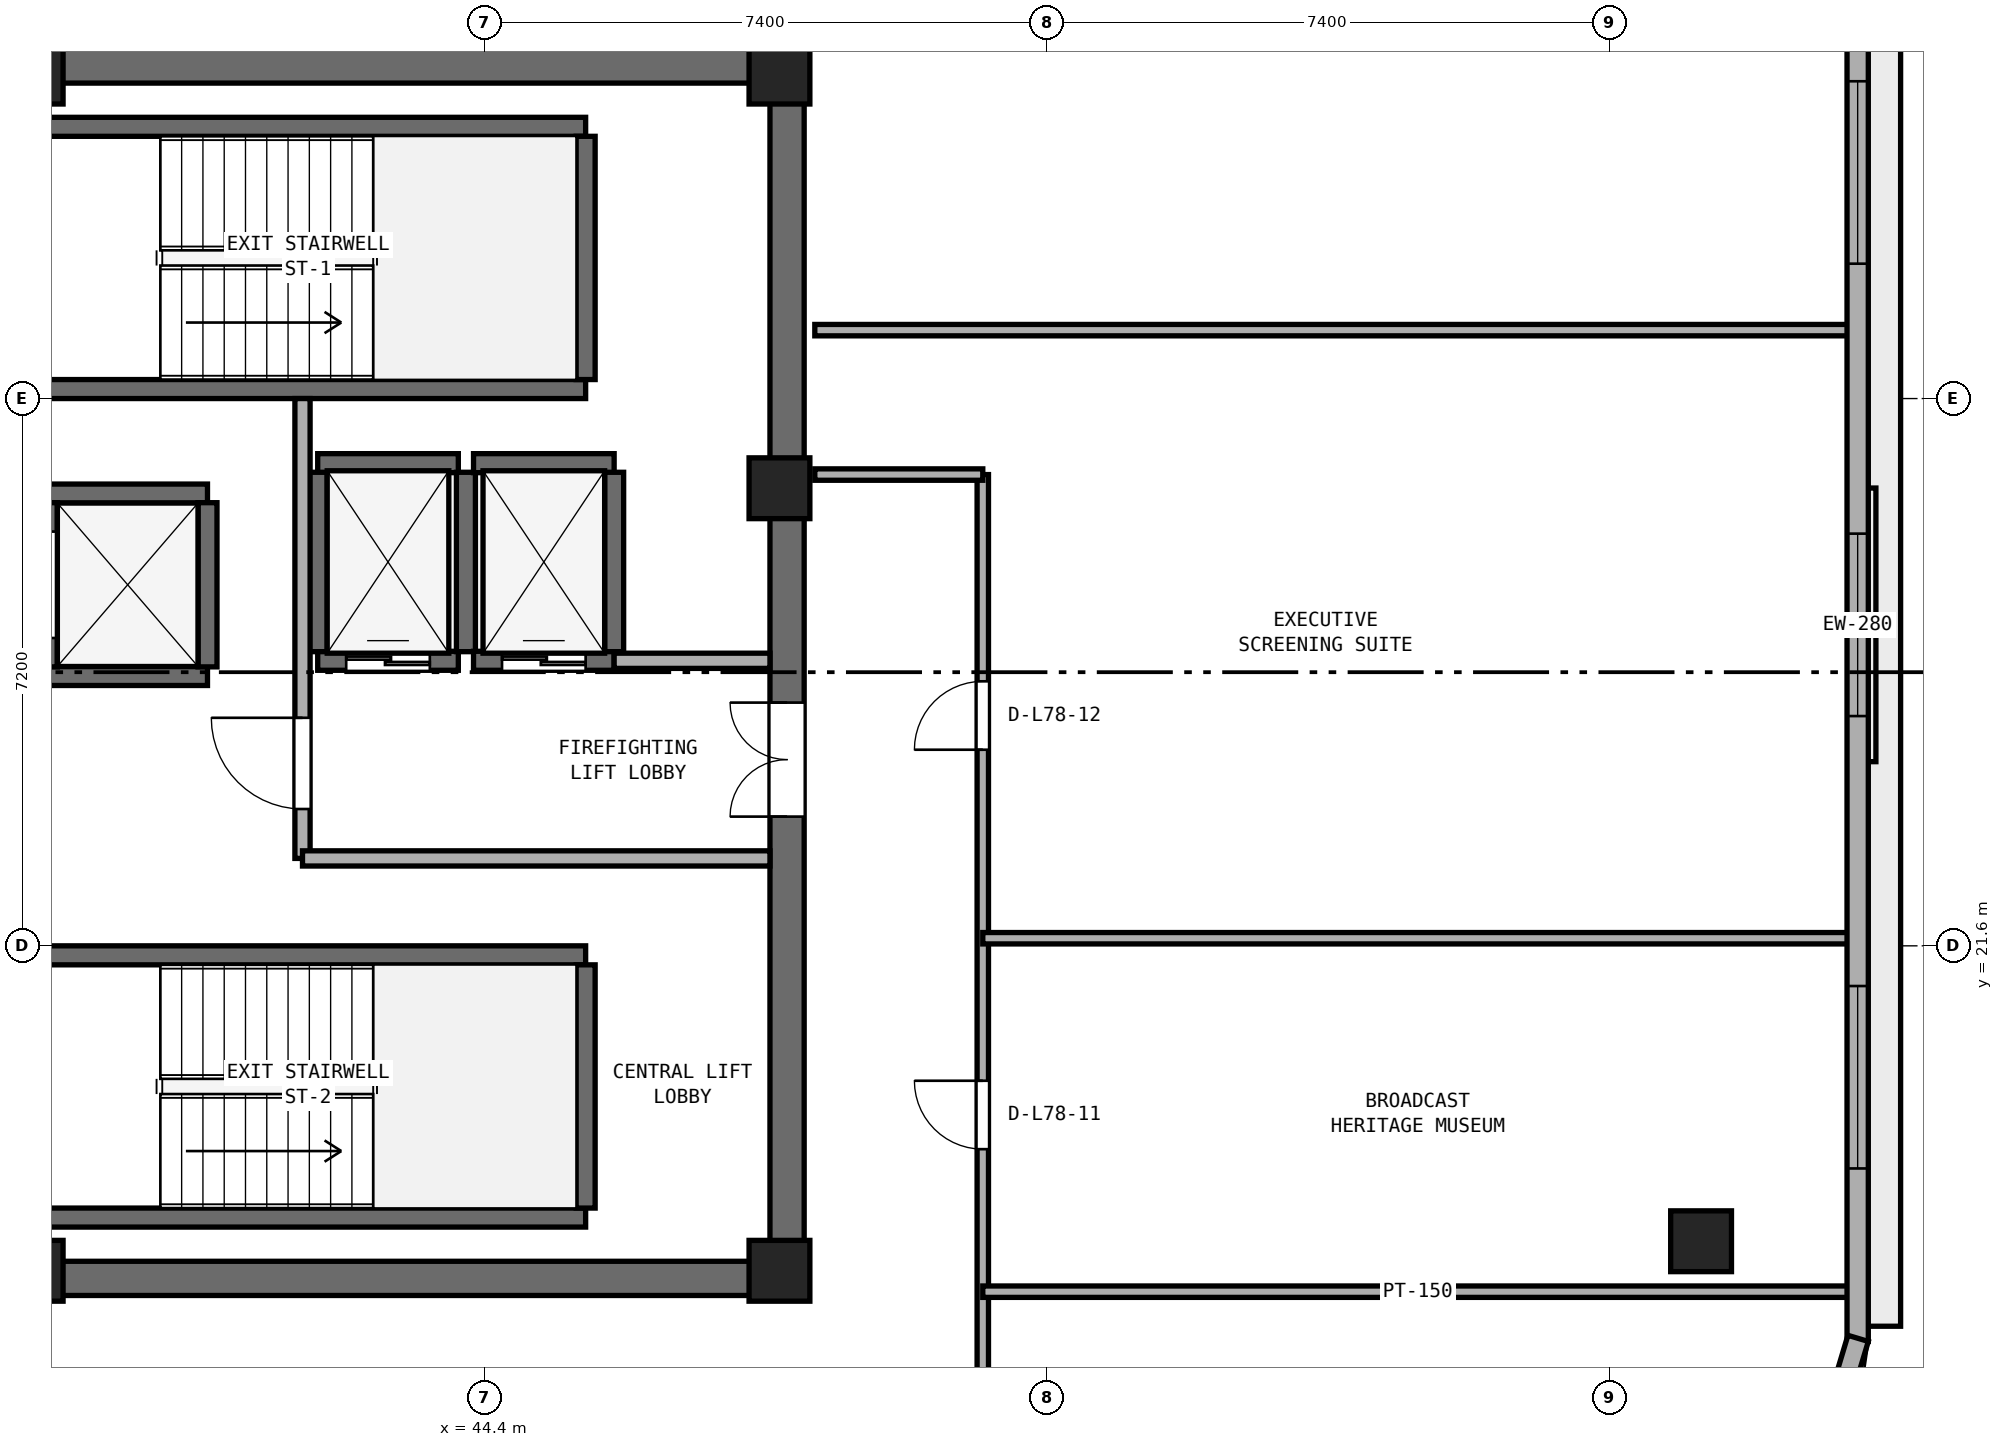
"""IFC4 building model, lengths in metres.
Left out: names, types, materials, properties, quantities, classifications, styles, units other than length and angle.
Written with IfcOpenShell. Run it as: python <this file> out.ifc"""

import sys

from ifc_helpers import new_model, si_unit, direction, frame, frame_2d, origin, origin_2d, place, context, subcontext, project, spatial, rectangle, extrude, element, fill, save


model = new_model("IFC4")
c1 = context("Model", 3, precision=1e-05, world=origin(), true_north=direction((0.0, 1.0)))
c2 = subcontext(c1, "Body", "Model", "MODEL_VIEW")
j1 = project(units=[si_unit("LENGTHUNIT", "METRE"), si_unit("PLANEANGLEUNIT", "RADIAN")], contexts=[c1])
p1 = place(None, origin())
s1 = spatial("IfcSite", under=j1, at=p1, CompositionType="ELEMENT")
p2 = place(p1, origin())
s2 = spatial("IfcBuilding", under=s1, at=p2, CompositionType="ELEMENT")
p3 = place(p2, frame((0.0, 0.0, 304.8)))
s3 = spatial("IfcBuildingStorey", under=s2, at=p3, CompositionType="ELEMENT", Elevation=304.8)
for number, where, z_axis, x_axis in (
    (1, (25.4, 17.225, 0.0), (0.0, 0.0, 1.0), (1.0, 0.0, 0.0)),
    (2, (25.4, 33.175, 0.0), (0.0, 0.0, 1.0), (1.0, 0.0, 0.0)),
):
    element("IfcWall", number, at=place(p3, frame(where, z_axis=z_axis, x_axis=x_axis)), inside=s3, PredefinedType="SHEAR", context=c2, shape_type="SweptSolid", body=[
        extrude(rectangle(XDim=23.2, YDim=0.45, at=frame_2d((11.6, 0.0))), origin(), (0.0, 0.0, 1.0), 3.4),
    ])
p4 = place(p3, frame((48.375, 17.45, 0.0), z_axis=(0.0, 0.0, 1.0), x_axis=(0.0, 1.0, 0.0)))
e3 = element("IfcWall", 3, at=p4, inside=s3, PredefinedType="SHEAR", context=c2, shape_type="SweptSolid", body=[
    extrude(rectangle(XDim=15.5, YDim=0.45, at=frame_2d((7.75, 0.0))), origin(), (0.0, 0.0, 1.0), 3.4),
])
p5 = place(p4, frame((5.85, 0.0, 0.0)))
e4 = element("IfcOpeningElement", 4, at=p5, cuts=e3, PredefinedType="OPENING", context=c2, shape_type="SweptSolid", body=[
    extrude(rectangle(XDim=1.5, YDim=2.15, at=frame_2d((0.75, 1.075))), frame((0.0, 0.235, 0.0), z_axis=(0.0, -1.0, 0.0), x_axis=(1.0, 0.0, 0.0)), (0.0, 0.0, 1.0), 0.47),
])
for number, where, z_axis, x_axis in (
    (5, (38.45, 17.325, 0.0), (0.0, 0.0, 1.0), (1.0, 0.0, 0.0)),
    (6, (48.275, 17.325, 0.0), (0.0, 0.0, 1.0), (1.0, 0.0, 0.0)),
    (7, (48.275, 27.62, 0.0), (0.0, 0.0, 1.0), (1.0, 0.0, 0.0)),
    (8, (48.275, 33.075, 0.0), (0.0, 0.0, 1.0), (1.0, 0.0, 0.0)),
    (9, (38.45, 33.075, 0.0), (0.0, 0.0, 1.0), (1.0, 0.0, 0.0)),
):
    element("IfcColumn", number, at=place(p3, frame(where, z_axis=z_axis, x_axis=x_axis)), inside=s3, PredefinedType="PILASTER", context=c2, shape_type="SweptSolid", body=[
        extrude(rectangle(XDim=0.8, YDim=0.8, at=origin_2d()), origin(), (0.0, 0.0, 1.0), 3.8),
    ])
p6 = place(p3, frame((60.4, 17.714, 0.0), z_axis=(0.0, 0.0, 1.0), x_axis=(1.0, 0.0, 0.0)))
e10 = element("IfcColumn", 10, at=p6, inside=s3, PredefinedType="COLUMN", context=c2, shape_type="SweptSolid", body=[
    extrude(rectangle(XDim=0.8, YDim=0.8, at=origin_2d()), origin(), (0.0, 0.0, 1.0), 3.8),
])
for number, where, z_axis, x_axis in (
    (11, (38.425, 28.925, 0.0), (0.0, 0.0, 1.0), (1.0, 0.0, 0.0)),
    (12, (38.425, 32.375, 0.0), (0.0, 0.0, 1.0), (1.0, 0.0, 0.0)),
):
    element("IfcWall", number, at=place(p3, frame(where, z_axis=z_axis, x_axis=x_axis)), inside=s3, PredefinedType="SHEAR", context=c2, shape_type="SweptSolid", body=[
        extrude(rectangle(XDim=7.3, YDim=0.25, at=frame_2d((3.65, 0.0))), origin(), (0.0, 0.0, 1.0), 3.4),
    ])
p7 = place(p3, frame((45.725, 29.05, 0.0), z_axis=(0.0, 0.0, 1.0), x_axis=(0.0, 1.0, 0.0)))
e13 = element("IfcWall", 13, at=p7, inside=s3, PredefinedType="SHEAR", context=c2, shape_type="SweptSolid", body=[
    extrude(rectangle(XDim=3.2, YDim=0.25, at=frame_2d((1.6, 0.0))), origin(), (0.0, 0.0, 1.0), 3.4),
])
for number, where, z_axis, x_axis in (
    (14, (38.425, 18.025, 0.0), (0.0, 0.0, 1.0), (1.0, 0.0, 0.0)),
    (15, (38.425, 21.475, 0.0), (0.0, 0.0, 1.0), (1.0, 0.0, 0.0)),
):
    element("IfcWall", number, at=place(p3, frame(where, z_axis=z_axis, x_axis=x_axis)), inside=s3, PredefinedType="SHEAR", context=c2, shape_type="SweptSolid", body=[
        extrude(rectangle(XDim=7.3, YDim=0.25, at=frame_2d((3.65, 0.0))), origin(), (0.0, 0.0, 1.0), 3.4),
    ])
p8 = place(p3, frame((45.725, 18.15, 0.0), z_axis=(0.0, 0.0, 1.0), x_axis=(0.0, 1.0, 0.0)))
e16 = element("IfcWall", 16, at=p8, inside=s3, PredefinedType="SHEAR", context=c2, shape_type="SweptSolid", body=[
    extrude(rectangle(XDim=3.2, YDim=0.25, at=frame_2d((1.6, 0.0))), origin(), (0.0, 0.0, 1.0), 3.4),
])
p9 = place(p3, frame((42.2, 25.35, 0.0), z_axis=(0.0, 0.0, 1.0), x_axis=(1.0, 0.0, 0.0)))
e17 = element("IfcWall", 17, at=p9, inside=s3, PredefinedType="SHEAR", context=c2, shape_type="SweptSolid", body=[
    extrude(rectangle(XDim=1.85, YDim=0.25, at=frame_2d((0.925, 0.0))), origin(), (0.0, 0.0, 1.0), 3.4),
])
p10 = place(p9, frame((0.375, 0.0, 0.0)))
e18 = element("IfcOpeningElement", 18, at=p10, cuts=e17, PredefinedType="OPENING", context=c2, shape_type="SweptSolid", body=[
    extrude(rectangle(XDim=1.1, YDim=2.15, at=frame_2d((0.55, 1.075))), frame((0.0, 0.135, 0.0), z_axis=(0.0, -1.0, 0.0), x_axis=(1.0, 0.0, 0.0)), (0.0, 0.0, 1.0), 0.27),
])
p11 = place(p3, frame((42.2, 27.95, 0.0), z_axis=(0.0, 0.0, 1.0), x_axis=(1.0, 0.0, 0.0)))
e19 = element("IfcWall", 19, at=p11, inside=s3, PredefinedType="SHEAR", context=c2, shape_type="SweptSolid", body=[
    extrude(rectangle(XDim=1.85, YDim=0.25, at=frame_2d((0.925, 0.0))), origin(), (0.0, 0.0, 1.0), 3.4),
])
for number, where, z_axis, x_axis in (
    (20, (42.2, 25.47, 0.0), (0.0, 0.0, 1.0), (0.0, 1.0, 0.0)),
    (21, (44.15, 25.47, 0.0), (0.0, 0.0, 1.0), (0.0, 1.0, 0.0)),
):
    element("IfcWall", number, at=place(p3, frame(where, z_axis=z_axis, x_axis=x_axis)), inside=s3, PredefinedType="SHEAR", context=c2, shape_type="SweptSolid", body=[
        extrude(rectangle(XDim=2.36, YDim=0.25, at=frame_2d((1.18, 0.0))), origin(), (0.0, 0.0, 1.0), 3.4),
    ])
p12 = place(p3, frame((44.25, 25.35, 0.0), z_axis=(0.0, 0.0, 1.0), x_axis=(1.0, 0.0, 0.0)))
e22 = element("IfcWall", 22, at=p12, inside=s3, PredefinedType="SHEAR", context=c2, shape_type="SweptSolid", body=[
    extrude(rectangle(XDim=1.85, YDim=0.25, at=frame_2d((0.925, 0.0))), origin(), (0.0, 0.0, 1.0), 3.4),
])
p13 = place(p12, frame((0.375, 0.0, 0.0)))
e23 = element("IfcOpeningElement", 23, at=p13, cuts=e22, PredefinedType="OPENING", context=c2, shape_type="SweptSolid", body=[
    extrude(rectangle(XDim=1.1, YDim=2.15, at=frame_2d((0.55, 1.075))), frame((0.0, 0.135, 0.0), z_axis=(0.0, -1.0, 0.0), x_axis=(1.0, 0.0, 0.0)), (0.0, 0.0, 1.0), 0.27),
])
p14 = place(p3, frame((44.25, 27.95, 0.0), z_axis=(0.0, 0.0, 1.0), x_axis=(1.0, 0.0, 0.0)))
e24 = element("IfcWall", 24, at=p14, inside=s3, PredefinedType="SHEAR", context=c2, shape_type="SweptSolid", body=[
    extrude(rectangle(XDim=1.85, YDim=0.25, at=frame_2d((0.925, 0.0))), origin(), (0.0, 0.0, 1.0), 3.4),
])
p15 = place(p3, frame((46.1, 25.47, 0.0), z_axis=(0.0, 0.0, 1.0), x_axis=(0.0, 1.0, 0.0)))
e25 = element("IfcWall", 25, at=p15, inside=s3, PredefinedType="SHEAR", context=c2, shape_type="SweptSolid", body=[
    extrude(rectangle(XDim=2.36, YDim=0.25, at=frame_2d((1.18, 0.0))), origin(), (0.0, 0.0, 1.0), 3.4),
])
for number, where, z_axis, x_axis in (
    (26, (38.65, 25.15, 0.0), (0.0, 0.0, 1.0), (1.0, 0.0, 0.0)),
    (27, (38.65, 27.55, 0.0), (0.0, 0.0, 1.0), (1.0, 0.0, 0.0)),
):
    element("IfcWall", number, at=place(p3, frame(where, z_axis=z_axis, x_axis=x_axis)), inside=s3, PredefinedType="SHEAR", context=c2, shape_type="SweptSolid", body=[
        extrude(rectangle(XDim=2.1, YDim=0.25, at=frame_2d((1.05, 0.0))), origin(), (0.0, 0.0, 1.0), 3.4),
    ])
p16 = place(p3, frame((38.65, 25.27, 0.0), z_axis=(0.0, 0.0, 1.0), x_axis=(0.0, 1.0, 0.0)))
e28 = element("IfcWall", 28, at=p16, inside=s3, PredefinedType="SHEAR", context=c2, shape_type="SweptSolid", body=[
    extrude(rectangle(XDim=2.16, YDim=0.25, at=frame_2d((1.08, 0.0))), origin(), (0.0, 0.0, 1.0), 3.4),
])
p17 = place(p16, frame((0.38, 0.0, 0.0)))
e29 = element("IfcOpeningElement", 29, at=p17, cuts=e28, PredefinedType="OPENING", context=c2, shape_type="SweptSolid", body=[
    extrude(rectangle(XDim=1.4, YDim=2.2, at=frame_2d((0.7, 1.1))), frame((0.0, 0.135, 0.0), z_axis=(0.0, -1.0, 0.0), x_axis=(1.0, 0.0, 0.0)), (0.0, 0.0, 1.0), 0.27),
])
p18 = place(p3, frame((40.75, 25.27, 0.0), z_axis=(0.0, 0.0, 1.0), x_axis=(0.0, 1.0, 0.0)))
e30 = element("IfcWall", 30, at=p18, inside=s3, PredefinedType="SHEAR", context=c2, shape_type="SweptSolid", body=[
    extrude(rectangle(XDim=2.16, YDim=0.25, at=frame_2d((1.08, 0.0))), origin(), (0.0, 0.0, 1.0), 3.4),
])
p19 = place(p3, frame((42.0, 22.75, 0.0), z_axis=(0.0, 0.0, 1.0), x_axis=(0.0, 1.0, 0.0)))
e31 = element("IfcWall", 31, at=p19, inside=s3, PredefinedType="SOLIDWALL", context=c2, shape_type="SweptSolid", body=[
    extrude(rectangle(XDim=6.05, YDim=0.2, at=frame_2d((3.025, 0.0))), origin(), (0.0, 0.0, 1.0), 3.4),
])
p20 = place(p19, frame((0.65, 0.0, 0.0)))
e32 = element("IfcOpeningElement", 32, at=p20, cuts=e31, PredefinedType="OPENING", context=c2, shape_type="SweptSolid", body=[
    extrude(rectangle(XDim=1.2, YDim=2.15, at=frame_2d((0.6, 1.075))), frame((0.0, 0.11, 0.0), z_axis=(0.0, -1.0, 0.0), x_axis=(1.0, 0.0, 0.0)), (0.0, 0.0, 1.0), 0.22),
])
p21 = place(p3, frame((42.0, 22.75, 0.0), z_axis=(0.0, 0.0, 1.0), x_axis=(1.0, 0.0, 0.0)))
e33 = element("IfcWall", 33, at=p21, inside=s3, PredefinedType="SOLIDWALL", context=c2, shape_type="SweptSolid", body=[
    extrude(rectangle(XDim=6.15, YDim=0.2, at=frame_2d((3.075, 0.0))), origin(), (0.0, 0.0, 1.0), 3.4),
])
p22 = place(p3, frame((46.1, 25.35, 0.0), z_axis=(0.0, 0.0, 1.0), x_axis=(1.0, 0.0, 0.0)))
e34 = element("IfcWall", 34, at=p22, inside=s3, PredefinedType="SOLIDWALL", context=c2, shape_type="SweptSolid", body=[
    extrude(rectangle(XDim=2.05, YDim=0.2, at=frame_2d((1.025, 0.0))), origin(), (0.0, 0.0, 1.0), 3.4),
])
p23 = place(p3, frame((50.95, 14.65, 0.0), z_axis=(0.0, 0.0, 1.0), x_axis=(0.0, 1.0, 0.0)))
e35 = element("IfcWall", 35, at=p23, inside=s3, PredefinedType="PARTITIONING", context=c2, shape_type="SweptSolid", body=[
    extrude(rectangle(XDim=13.15, YDim=0.15, at=frame_2d((6.575, 0.0))), origin(), (0.0, 0.0, 1.0), 3.4),
])
p24 = place(p23, frame((4.275, 0.0, 0.0)))
e36 = element("IfcOpeningElement", 36, at=p24, cuts=e35, PredefinedType="OPENING", context=c2, shape_type="SweptSolid", body=[
    extrude(rectangle(XDim=0.9, YDim=2.1, at=frame_2d((0.45, 1.05))), frame((0.0, 0.085, 0.0), z_axis=(0.0, -1.0, 0.0), x_axis=(1.0, 0.0, 0.0)), (0.0, 0.0, 1.0), 0.17),
])
p25 = place(p23, frame((9.53, 0.0, 0.0)))
e37 = element("IfcOpeningElement", 37, at=p25, cuts=e35, PredefinedType="OPENING", context=c2, shape_type="SweptSolid", body=[
    extrude(rectangle(XDim=0.9, YDim=2.1, at=frame_2d((0.45, 1.05))), frame((0.0, 0.085, 0.0), z_axis=(0.0, -1.0, 0.0), x_axis=(1.0, 0.0, 0.0)), (0.0, 0.0, 1.0), 0.17),
])
for number, where, z_axis, x_axis in (
    (38, (50.95, 17.05, 0.0), (0.0, 0.0, 1.0), (1.0, 0.0, 0.0)),
    (39, (50.95, 21.7, 0.0), (0.0, 0.0, 1.0), (1.0, 0.0, 0.0)),
):
    element("IfcWall", number, at=place(p3, frame(where, z_axis=z_axis, x_axis=x_axis)), inside=s3, PredefinedType="PARTITIONING", context=c2, shape_type="SweptSolid", body=[
        extrude(rectangle(XDim=11.445, YDim=0.15, at=frame_2d((5.723, 0.0))), origin(), (0.0, 0.0, 1.0), 3.4),
    ])
p26 = place(p3, frame((48.74, 27.8, 0.0), z_axis=(0.0, 0.0, 1.0), x_axis=(1.0, 0.0, 0.0)))
e40 = element("IfcWall", 40, at=p26, inside=s3, PredefinedType="PARTITIONING", context=c2, shape_type="SweptSolid", body=[
    extrude(rectangle(XDim=2.21, YDim=0.15, at=frame_2d((1.105, 0.0))), origin(), (0.0, 0.0, 1.0), 3.4),
])
p27 = place(p3, frame((48.74, 29.7, 0.0), z_axis=(0.0, 0.0, 1.0), x_axis=(1.0, 0.0, 0.0)))
e41 = element("IfcWall", 41, at=p27, inside=s3, PredefinedType="PARTITIONING", context=c2, shape_type="SweptSolid", body=[
    extrude(rectangle(XDim=13.655, YDim=0.15, at=frame_2d((6.828, 0.0))), origin(), (0.0, 0.0, 1.0), 3.4),
])
p28 = place(p3, frame((62.46, 16.396, 0.0), z_axis=(0.0, 0.0, 1.0), x_axis=(0.0, 1.0, 0.0)))
e42 = element("IfcWall", 42, at=p28, inside=s3, PredefinedType="STANDARD", context=c2, shape_type="SweptSolid", body=[
    extrude(rectangle(XDim=18.854, YDim=0.28, at=frame_2d((9.427, 0.0))), origin(), (0.0, 0.0, 1.0), 3.4),
])
p29 = place(p28, frame((2.276, 0.0, 0.9)))
e43 = element("IfcOpeningElement", 43, at=p29, cuts=e42, PredefinedType="OPENING", context=c2, shape_type="SweptSolid", body=[
    extrude(rectangle(XDim=2.4, YDim=1.75, at=frame_2d((1.2, 0.875))), frame((0.0, 0.15, 0.0), z_axis=(0.0, -1.0, 0.0), x_axis=(1.0, 0.0, 0.0)), (0.0, 0.0, 1.0), 0.3),
])
p30 = place(p28, frame((8.227, 0.0, 0.9)))
e44 = element("IfcOpeningElement", 44, at=p30, cuts=e42, PredefinedType="OPENING", context=c2, shape_type="SweptSolid", body=[
    extrude(rectangle(XDim=2.4, YDim=1.75, at=frame_2d((1.2, 0.875))), frame((0.0, 0.15, 0.0), z_axis=(0.0, -1.0, 0.0), x_axis=(1.0, 0.0, 0.0)), (0.0, 0.0, 1.0), 0.3),
])
p31 = place(p28, frame((14.179, 0.0, 0.9)))
e45 = element("IfcOpeningElement", 45, at=p31, cuts=e42, PredefinedType="OPENING", context=c2, shape_type="SweptSolid", body=[
    extrude(rectangle(XDim=2.4, YDim=1.75, at=frame_2d((1.2, 0.875))), frame((0.0, 0.15, 0.0), z_axis=(0.0, -1.0, 0.0), x_axis=(1.0, 0.0, 0.0)), (0.0, 0.0, 1.0), 0.3),
])
p32 = place(p3, frame((61.839, 14.344, 0.0), z_axis=(0.0, 0.0, 1.0), x_axis=(0.287235049694, 0.957860128739, 0.0)))
e46 = element("IfcWall", 46, at=p32, inside=s3, PredefinedType="STANDARD", context=c2, shape_type="SweptSolid", body=[
    extrude(rectangle(XDim=2.184, YDim=0.28, at=frame_2d((1.092, 0.0))), origin(), (0.0, 0.0, 1.0), 3.4),
])
p33 = place(p10, origin())
e47 = element("IfcDoor", 47, at=p33, inside=s3, OperationType="DOUBLE_DOOR_SLIDING", PredefinedType="DOOR", context=c2, shape_type="SweptSolid", body=[
    extrude(rectangle(XDim=1.1, YDim=2.15, at=frame_2d((0.55, 1.075))), frame((0.0, 0.025, 0.0), z_axis=(0.0, -1.0, 0.0), x_axis=(1.0, 0.0, 0.0)), (0.0, 0.0, 1.0), 0.05),
])
fill(e18, e47)
p34 = place(p13, origin())
e48 = element("IfcDoor", 48, at=p34, inside=s3, OperationType="DOUBLE_DOOR_SLIDING", PredefinedType="DOOR", context=c2, shape_type="SweptSolid", body=[
    extrude(rectangle(XDim=1.1, YDim=2.15, at=frame_2d((0.55, 1.075))), frame((0.0, 0.025, 0.0), z_axis=(0.0, -1.0, 0.0), x_axis=(1.0, 0.0, 0.0)), (0.0, 0.0, 1.0), 0.05),
])
fill(e23, e48)
p35 = place(p20, origin())
e49 = element("IfcDoor", 49, at=p35, inside=s3, OperationType="SINGLE_SWING_RIGHT", PredefinedType="DOOR", context=c2, shape_type="SweptSolid", body=[
    extrude(rectangle(XDim=1.2, YDim=2.15, at=frame_2d((0.6, 1.075))), frame((0.0, 0.025, 0.0), z_axis=(0.0, -1.0, 0.0), x_axis=(1.0, 0.0, 0.0)), (0.0, 0.0, 1.0), 0.05),
])
fill(e32, e49)
p36 = place(p5, origin())
e50 = element("IfcDoor", 50, at=p36, inside=s3, OperationType="DOUBLE_DOOR_SINGLE_SWING", PredefinedType="DOOR", context=c2, shape_type="SweptSolid", body=[
    extrude(rectangle(XDim=1.5, YDim=2.15, at=frame_2d((0.75, 1.075))), frame((0.0, 0.025, 0.0), z_axis=(0.0, -1.0, 0.0), x_axis=(1.0, 0.0, 0.0)), (0.0, 0.0, 1.0), 0.05),
])
fill(e4, e50)
p37 = place(p24, origin())
e51 = element("IfcDoor", 51, at=p37, inside=s3, OperationType="SINGLE_SWING_RIGHT", PredefinedType="DOOR", context=c2, shape_type="SweptSolid", body=[
    extrude(rectangle(XDim=0.9, YDim=2.1, at=frame_2d((0.45, 1.05))), frame((0.0, 0.025, 0.0), z_axis=(0.0, -1.0, 0.0), x_axis=(1.0, 0.0, 0.0)), (0.0, 0.0, 1.0), 0.05),
])
fill(e36, e51)
p38 = place(p25, origin())
e52 = element("IfcDoor", 52, at=p38, inside=s3, OperationType="SINGLE_SWING_LEFT", PredefinedType="DOOR", context=c2, shape_type="SweptSolid", body=[
    extrude(rectangle(XDim=0.9, YDim=2.1, at=frame_2d((0.45, 1.05))), frame((0.0, 0.025, 0.0), z_axis=(0.0, -1.0, 0.0), x_axis=(1.0, 0.0, 0.0)), (0.0, 0.0, 1.0), 0.05),
])
fill(e37, e52)
p39 = place(p29, origin())
e53 = element("IfcWindow", 53, at=p39, inside=s3, PartitioningType="SINGLE_PANEL", PredefinedType="WINDOW", context=c2, shape_type="SweptSolid", body=[
    extrude(rectangle(XDim=2.4, YDim=1.75, at=frame_2d((1.2, 0.875))), frame((0.0, 0.03, 0.0), z_axis=(0.0, -1.0, 0.0), x_axis=(1.0, 0.0, 0.0)), (0.0, 0.0, 1.0), 0.06),
])
fill(e43, e53)
p40 = place(p30, origin())
e54 = element("IfcWindow", 54, at=p40, inside=s3, PartitioningType="SINGLE_PANEL", PredefinedType="WINDOW", context=c2, shape_type="SweptSolid", body=[
    extrude(rectangle(XDim=2.4, YDim=1.75, at=frame_2d((1.2, 0.875))), frame((0.0, 0.03, 0.0), z_axis=(0.0, -1.0, 0.0), x_axis=(1.0, 0.0, 0.0)), (0.0, 0.0, 1.0), 0.06),
])
fill(e44, e54)
p41 = place(p31, origin())
e55 = element("IfcWindow", 55, at=p41, inside=s3, PartitioningType="SINGLE_PANEL", PredefinedType="WINDOW", context=c2, shape_type="SweptSolid", body=[
    extrude(rectangle(XDim=2.4, YDim=1.75, at=frame_2d((1.2, 0.875))), frame((0.0, 0.03, 0.0), z_axis=(0.0, -1.0, 0.0), x_axis=(1.0, 0.0, 0.0)), (0.0, 0.0, 1.0), 0.06),
])
fill(e45, e55)
save(model, sys.argv[1])
